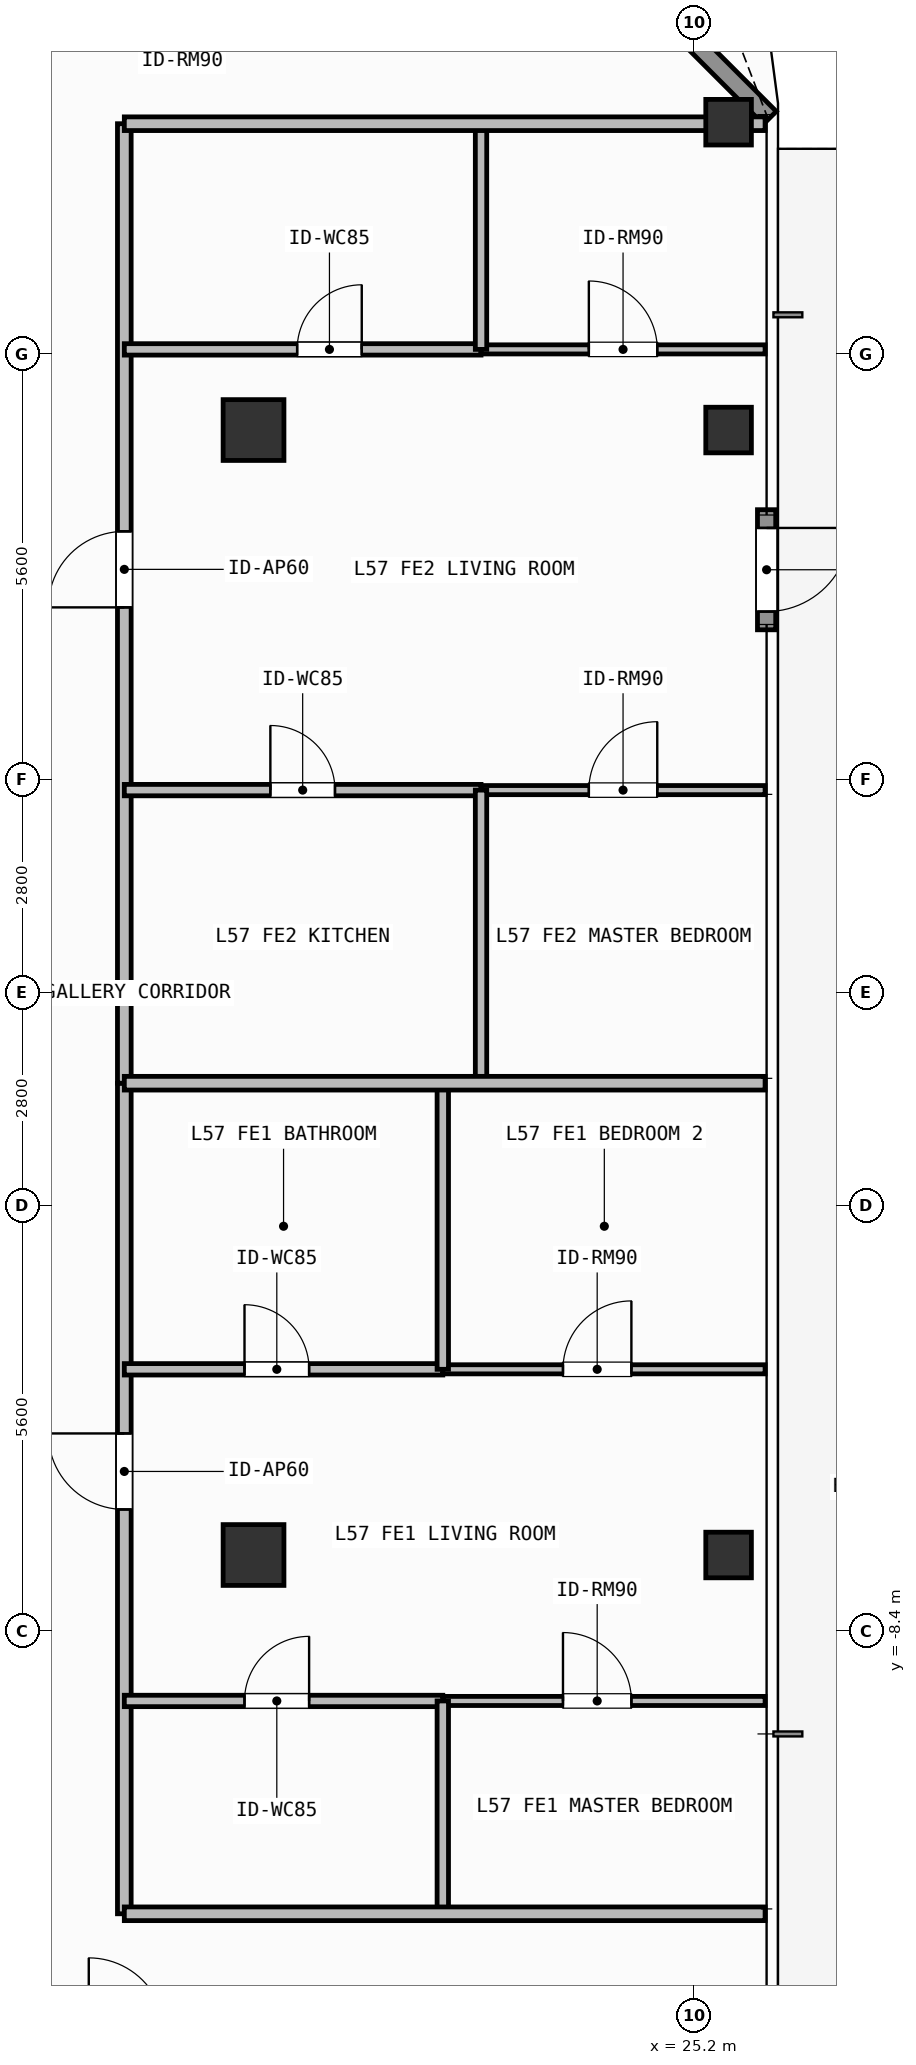
"""IFC4 building model, lengths in metres.
Left out: names, types, materials, properties, quantities, classifications, styles, units other than length and angle.
Written with IfcOpenShell. Run it as: python <this file> out.ifc"""

import sys

from ifc_helpers import new_model, si_unit, direction, frame, frame_2d, origin, origin_2d, place, context, subcontext, project, spatial, rectangle, hollow_rectangle, extrude, element, fill, save


model = new_model("IFC4")
c1 = context("Model", 3, precision=1e-05, world=origin(), true_north=direction((0.0, 1.0)))
c2 = subcontext(c1, "Body", "Model", "MODEL_VIEW")
j1 = project(units=[si_unit("LENGTHUNIT", "METRE"), si_unit("PLANEANGLEUNIT", "RADIAN")], contexts=[c1])
p1 = place(None, origin())
s1 = spatial("IfcSite", under=j1, at=p1, CompositionType="ELEMENT")
p2 = place(p1, origin())
s2 = spatial("IfcBuilding", under=s1, at=p2, CompositionType="ELEMENT")
p3 = place(p2, frame((0.0, 0.0, 231.3)))
s3 = spatial("IfcBuildingStorey", under=s2, at=p3, CompositionType="ELEMENT", Elevation=231.3)
for number, where, z_axis, x_axis in (
    (1, (19.4, -7.4, 0.0), (0.0, 0.0, 1.0), (1.0, 0.0, 0.0)),
    (2, (19.4, 7.4, 0.0), (0.0, 0.0, 1.0), (1.0, 0.0, 0.0)),
):
    element("IfcColumn", number, at=place(p3, frame(where, z_axis=z_axis, x_axis=x_axis)), inside=s3, PredefinedType="COLUMN", context=c2, shape_type="SweptSolid", body=[
        extrude(hollow_rectangle(XDim=0.8, YDim=0.8, WallThickness=0.036, at=origin_2d()), origin(), (0.0, 0.0, 1.0), 3.9),
    ])
for number, where, z_axis, x_axis in (
    (3, (25.65, 11.45, 0.0), (0.0, 0.0, 1.0), (1.0, 0.0, 0.0)),
    (4, (25.65, -7.4, 0.0), (0.0, 0.0, 1.0), (1.0, 0.0, 0.0)),
    (5, (25.65, 7.4, 0.0), (0.0, 0.0, 1.0), (1.0, 0.0, 0.0)),
):
    element("IfcColumn", number, at=place(p3, frame(where, z_axis=z_axis, x_axis=x_axis)), inside=s3, PredefinedType="COLUMN", context=c2, shape_type="SweptSolid", body=[
        extrude(hollow_rectangle(XDim=0.6, YDim=0.6, WallThickness=0.028, at=origin_2d()), origin(), (0.0, 0.0, 1.0), 3.9),
    ])
p4 = place(p3, frame((26.15, 6.352, 0.0), z_axis=(0.0, 0.0, 1.0), x_axis=(0.0, -1.0, 0.0)))
e6 = element("IfcWall", 6, at=p4, inside=s3, PredefinedType="SOLIDWALL", context=c2, shape_type="SweptSolid", body=[
    extrude(rectangle(XDim=1.58, YDim=0.24, at=frame_2d((0.79, 0.0))), origin(), (0.0, 0.0, 1.0), 3.6),
])
p5 = place(p4, frame((0.24, 0.0, 0.0)))
e7 = element("IfcOpeningElement", 7, at=p5, cuts=e6, PredefinedType="OPENING", context=c2, shape_type="SweptSolid", body=[
    extrude(rectangle(XDim=1.1, YDim=2.2, at=frame_2d((0.55, 1.1))), frame((0.0, 0.13, 0.0), z_axis=(0.0, -1.0, 0.0), x_axis=(1.0, 0.0, 0.0)), (0.0, 0.0, 1.0), 0.26),
])
p6 = place(p3, frame((21.808, 15.892, 0.0), z_axis=(0.0, 0.0, 1.0), x_axis=(0.707106781187, -0.707106781187, 0.0)))
e8 = element("IfcWall", 8, at=p6, inside=s3, PredefinedType="SOLIDWALL", context=c2, shape_type="SweptSolid", body=[
    extrude(rectangle(XDim=6.201, YDim=0.24, at=frame_2d((3.101, 0.0))), origin(), (0.0, 0.0, 1.0), 3.6),
])
p7 = place(p6, frame((2.351, 0.0, 0.8)))
e9 = element("IfcOpeningElement", 9, at=p7, cuts=e8, PredefinedType="OPENING", context=c2, shape_type="SweptSolid", body=[
    extrude(rectangle(XDim=1.5, YDim=1.85, at=frame_2d((0.75, 0.925))), frame((0.0, 0.13, 0.0), z_axis=(0.0, -1.0, 0.0), x_axis=(1.0, 0.0, 0.0)), (0.0, 0.0, 1.0), 0.26),
])
p8 = place(p3, frame((17.7, -12.12, 0.0), z_axis=(0.0, 0.0, 1.0), x_axis=(0.0, 1.0, 0.0)))
e10 = element("IfcWall", 10, at=p8, inside=s3, PredefinedType="PARTITIONING", context=c2, shape_type="SweptSolid", body=[
    extrude(rectangle(XDim=10.927, YDim=0.18, at=frame_2d((5.463, 0.0))), origin(), (0.0, 0.0, 1.0), 3.6),
])
p9 = place(p8, frame((5.319, 0.0, 0.0)))
e11 = element("IfcOpeningElement", 11, at=p9, cuts=e10, PredefinedType="OPENING", context=c2, shape_type="SweptSolid", body=[
    extrude(rectangle(XDim=1.0, YDim=2.2, at=frame_2d((0.5, 1.1))), frame((0.0, 0.1, 0.0), z_axis=(0.0, -1.0, 0.0), x_axis=(1.0, 0.0, 0.0)), (0.0, 0.0, 1.0), 0.2),
])
p10 = place(p3, frame((17.7, -4.957, 0.0), z_axis=(0.0, 0.0, 1.0), x_axis=(1.0, 0.0, 0.0)))
e12 = element("IfcWall", 12, at=p10, inside=s3, PredefinedType="PARTITIONING", context=c2, shape_type="SweptSolid", body=[
    extrude(rectangle(XDim=4.19, YDim=0.15, at=frame_2d((2.095, 0.0))), origin(), (0.0, 0.0, 1.0), 3.6),
])
p11 = place(p10, frame((1.581, 0.0, 0.0)))
e13 = element("IfcOpeningElement", 13, at=p11, cuts=e12, PredefinedType="OPENING", context=c2, shape_type="SweptSolid", body=[
    extrude(rectangle(XDim=0.85, YDim=2.1, at=frame_2d((0.425, 1.05))), frame((0.0, 0.085, 0.0), z_axis=(0.0, -1.0, 0.0), x_axis=(1.0, 0.0, 0.0)), (0.0, 0.0, 1.0), 0.17),
])
p12 = place(p3, frame((17.7, -9.32, 0.0), z_axis=(0.0, 0.0, 1.0), x_axis=(1.0, 0.0, 0.0)))
e14 = element("IfcWall", 14, at=p12, inside=s3, PredefinedType="PARTITIONING", context=c2, shape_type="SweptSolid", body=[
    extrude(rectangle(XDim=4.19, YDim=0.15, at=frame_2d((2.095, 0.0))), origin(), (0.0, 0.0, 1.0), 3.6),
])
p13 = place(p12, frame((1.581, 0.0, 0.0)))
e15 = element("IfcOpeningElement", 15, at=p13, cuts=e14, PredefinedType="OPENING", context=c2, shape_type="SweptSolid", body=[
    extrude(rectangle(XDim=0.85, YDim=2.1, at=frame_2d((0.425, 1.05))), frame((0.0, 0.085, 0.0), z_axis=(0.0, -1.0, 0.0), x_axis=(1.0, 0.0, 0.0)), (0.0, 0.0, 1.0), 0.17),
])
p14 = place(p3, frame((21.89, -9.32, 0.0), z_axis=(0.0, 0.0, 1.0), x_axis=(1.0, 0.0, 0.0)))
e16 = element("IfcWall", 16, at=p14, inside=s3, PredefinedType="PARTITIONING", context=c2, shape_type="SweptSolid", body=[
    extrude(rectangle(XDim=4.24, YDim=0.12, at=frame_2d((2.12, 0.0))), origin(), (0.0, 0.0, 1.0), 3.6),
])
p15 = place(p14, frame((1.581, 0.0, 0.0)))
e17 = element("IfcOpeningElement", 17, at=p15, cuts=e16, PredefinedType="OPENING", context=c2, shape_type="SweptSolid", body=[
    extrude(rectangle(XDim=0.9, YDim=2.1, at=frame_2d((0.45, 1.05))), frame((0.0, 0.07, 0.0), z_axis=(0.0, -1.0, 0.0), x_axis=(1.0, 0.0, 0.0)), (0.0, 0.0, 1.0), 0.14),
])
p16 = place(p3, frame((21.89, -4.957, 0.0), z_axis=(0.0, 0.0, 1.0), x_axis=(1.0, 0.0, 0.0)))
e18 = element("IfcWall", 18, at=p16, inside=s3, PredefinedType="PARTITIONING", context=c2, shape_type="SweptSolid", body=[
    extrude(rectangle(XDim=4.24, YDim=0.12, at=frame_2d((2.12, 0.0))), origin(), (0.0, 0.0, 1.0), 3.6),
])
p17 = place(p16, frame((1.581, 0.0, 0.0)))
e19 = element("IfcOpeningElement", 19, at=p17, cuts=e18, PredefinedType="OPENING", context=c2, shape_type="SweptSolid", body=[
    extrude(rectangle(XDim=0.9, YDim=2.1, at=frame_2d((0.45, 1.05))), frame((0.0, 0.07, 0.0), z_axis=(0.0, -1.0, 0.0), x_axis=(1.0, 0.0, 0.0)), (0.0, 0.0, 1.0), 0.14),
])
p18 = place(p3, frame((17.7, -1.193, 0.0), z_axis=(0.0, 0.0, 1.0), x_axis=(0.0, 1.0, 0.0)))
e20 = element("IfcWall", 20, at=p18, inside=s3, PredefinedType="PARTITIONING", context=c2, shape_type="SweptSolid", body=[
    extrude(rectangle(XDim=12.623, YDim=0.18, at=frame_2d((6.312, 0.0))), origin(), (0.0, 0.0, 1.0), 3.6),
])
p19 = place(p18, frame((6.26, 0.0, 0.0)))
e21 = element("IfcOpeningElement", 21, at=p19, cuts=e20, PredefinedType="OPENING", context=c2, shape_type="SweptSolid", body=[
    extrude(rectangle(XDim=1.0, YDim=2.2, at=frame_2d((0.5, 1.1))), frame((0.0, 0.1, 0.0), z_axis=(0.0, -1.0, 0.0), x_axis=(1.0, 0.0, 0.0)), (0.0, 0.0, 1.0), 0.2),
])
p20 = place(p3, frame((17.7, 8.461, 0.0), z_axis=(0.0, 0.0, 1.0), x_axis=(1.0, 0.0, 0.0)))
e22 = element("IfcWall", 22, at=p20, inside=s3, PredefinedType="PARTITIONING", context=c2, shape_type="SweptSolid", body=[
    extrude(rectangle(XDim=4.693, YDim=0.15, at=frame_2d((2.347, 0.0))), origin(), (0.0, 0.0, 1.0), 3.6),
])
p21 = place(p20, frame((2.274, 0.0, 0.0)))
e23 = element("IfcOpeningElement", 23, at=p21, cuts=e22, PredefinedType="OPENING", context=c2, shape_type="SweptSolid", body=[
    extrude(rectangle(XDim=0.85, YDim=2.1, at=frame_2d((0.425, 1.05))), frame((0.0, 0.085, 0.0), z_axis=(0.0, -1.0, 0.0), x_axis=(1.0, 0.0, 0.0)), (0.0, 0.0, 1.0), 0.17),
])
p22 = place(p3, frame((17.7, 2.663, 0.0), z_axis=(0.0, 0.0, 1.0), x_axis=(1.0, 0.0, 0.0)))
e24 = element("IfcWall", 24, at=p22, inside=s3, PredefinedType="PARTITIONING", context=c2, shape_type="SweptSolid", body=[
    extrude(rectangle(XDim=4.693, YDim=0.15, at=frame_2d((2.347, 0.0))), origin(), (0.0, 0.0, 1.0), 3.6),
])
p23 = place(p22, frame((1.921, 0.0, 0.0)))
e25 = element("IfcOpeningElement", 25, at=p23, cuts=e24, PredefinedType="OPENING", context=c2, shape_type="SweptSolid", body=[
    extrude(rectangle(XDim=0.85, YDim=2.1, at=frame_2d((0.425, 1.05))), frame((0.0, 0.085, 0.0), z_axis=(0.0, -1.0, 0.0), x_axis=(1.0, 0.0, 0.0)), (0.0, 0.0, 1.0), 0.17),
])
p24 = place(p3, frame((22.393, 2.663, 0.0), z_axis=(0.0, 0.0, 1.0), x_axis=(1.0, 0.0, 0.0)))
e26 = element("IfcWall", 26, at=p24, inside=s3, PredefinedType="PARTITIONING", context=c2, shape_type="SweptSolid", body=[
    extrude(rectangle(XDim=3.737, YDim=0.12, at=frame_2d((1.868, 0.0))), origin(), (0.0, 0.0, 1.0), 3.6),
])
p25 = place(p24, frame((1.418, 0.0, 0.0)))
e27 = element("IfcOpeningElement", 27, at=p25, cuts=e26, PredefinedType="OPENING", context=c2, shape_type="SweptSolid", body=[
    extrude(rectangle(XDim=0.9, YDim=2.1, at=frame_2d((0.45, 1.05))), frame((0.0, 0.07, 0.0), z_axis=(0.0, -1.0, 0.0), x_axis=(1.0, 0.0, 0.0)), (0.0, 0.0, 1.0), 0.14),
])
p26 = place(p3, frame((22.393, 8.461, 0.0), z_axis=(0.0, 0.0, 1.0), x_axis=(1.0, 0.0, 0.0)))
e28 = element("IfcWall", 28, at=p26, inside=s3, PredefinedType="PARTITIONING", context=c2, shape_type="SweptSolid", body=[
    extrude(rectangle(XDim=3.737, YDim=0.12, at=frame_2d((1.868, 0.0))), origin(), (0.0, 0.0, 1.0), 3.6),
])
p27 = place(p26, frame((1.418, 0.0, 0.0)))
e29 = element("IfcOpeningElement", 29, at=p27, cuts=e28, PredefinedType="OPENING", context=c2, shape_type="SweptSolid", body=[
    extrude(rectangle(XDim=0.9, YDim=2.1, at=frame_2d((0.45, 1.05))), frame((0.0, 0.07, 0.0), z_axis=(0.0, -1.0, 0.0), x_axis=(1.0, 0.0, 0.0)), (0.0, 0.0, 1.0), 0.14),
])
p28 = place(p3, frame((21.89, -12.12, 0.0), z_axis=(0.0, 0.0, 1.0), x_axis=(0.0, 1.0, 0.0)))
e30 = element("IfcWall", 30, at=p28, inside=s3, PredefinedType="PARTITIONING", context=c2, shape_type="SweptSolid", body=[
    extrude(rectangle(XDim=2.8, YDim=0.15, at=frame_2d((1.4, 0.0))), origin(), (0.0, 0.0, 1.0), 3.6),
])
p29 = place(p3, frame((21.89, -4.957, 0.0), z_axis=(0.0, 0.0, 1.0), x_axis=(0.0, 1.0, 0.0)))
e31 = element("IfcWall", 31, at=p29, inside=s3, PredefinedType="PARTITIONING", context=c2, shape_type="SweptSolid", body=[
    extrude(rectangle(XDim=3.764, YDim=0.15, at=frame_2d((1.882, 0.0))), origin(), (0.0, 0.0, 1.0), 3.6),
])
p30 = place(p3, frame((22.393, -1.193, 0.0), z_axis=(0.0, 0.0, 1.0), x_axis=(0.0, 1.0, 0.0)))
e32 = element("IfcWall", 32, at=p30, inside=s3, PredefinedType="PARTITIONING", context=c2, shape_type="SweptSolid", body=[
    extrude(rectangle(XDim=3.856, YDim=0.15, at=frame_2d((1.928, 0.0))), origin(), (0.0, 0.0, 1.0), 3.6),
])
p31 = place(p3, frame((22.393, 8.461, 0.0), z_axis=(0.0, 0.0, 1.0), x_axis=(0.0, 1.0, 0.0)))
e33 = element("IfcWall", 33, at=p31, inside=s3, PredefinedType="PARTITIONING", context=c2, shape_type="SweptSolid", body=[
    extrude(rectangle(XDim=2.969, YDim=0.15, at=frame_2d((1.484, 0.0))), origin(), (0.0, 0.0, 1.0), 3.6),
])
for number, where, z_axis, x_axis in (
    (34, (17.7, -1.193, 0.0), (0.0, 0.0, 1.0), (1.0, 0.0, 0.0)),
    (35, (17.7, -12.12, 0.0), (0.0, 0.0, 1.0), (1.0, 0.0, 0.0)),
):
    element("IfcWall", number, at=place(p3, frame(where, z_axis=z_axis, x_axis=x_axis)), inside=s3, PredefinedType="PARTITIONING", context=c2, shape_type="SweptSolid", body=[
        extrude(rectangle(XDim=8.43, YDim=0.18, at=frame_2d((4.215, 0.0))), origin(), (0.0, 0.0, 1.0), 3.6),
    ])
p32 = place(p3, frame((17.7, 11.43, 0.0), z_axis=(0.0, 0.0, 1.0), x_axis=(1.0, 0.0, 0.0)))
e36 = element("IfcWall", 36, at=p32, inside=s3, PredefinedType="PARTITIONING", context=c2, shape_type="SweptSolid", body=[
    extrude(rectangle(XDim=8.43, YDim=0.18, at=frame_2d((4.215, 0.0))), origin(), (0.0, 0.0, 1.0), 3.34),
])
p33 = place(p5, origin())
e37 = element("IfcDoor", 37, at=p33, inside=s3, OperationType="SINGLE_SWING_LEFT", PredefinedType="DOOR", context=c2, shape_type="SweptSolid", body=[
    extrude(rectangle(XDim=1.1, YDim=2.2, at=frame_2d((0.55, 1.1))), frame((0.0, 0.025, 0.0), z_axis=(0.0, -1.0, 0.0), x_axis=(1.0, 0.0, 0.0)), (0.0, 0.0, 1.0), 0.05),
])
fill(e7, e37)
p34 = place(p9, origin())
e38 = element("IfcDoor", 38, at=p34, inside=s3, OperationType="SINGLE_SWING_RIGHT", PredefinedType="DOOR", context=c2, shape_type="SweptSolid", body=[
    extrude(rectangle(XDim=1.0, YDim=2.2, at=frame_2d((0.5, 1.1))), frame((0.0, 0.025, 0.0), z_axis=(0.0, -1.0, 0.0), x_axis=(1.0, 0.0, 0.0)), (0.0, 0.0, 1.0), 0.05),
])
fill(e11, e38)
p35 = place(p11, origin())
e39 = element("IfcDoor", 39, at=p35, inside=s3, OperationType="SINGLE_SWING_LEFT", PredefinedType="DOOR", context=c2, shape_type="SweptSolid", body=[
    extrude(rectangle(XDim=0.85, YDim=2.1, at=frame_2d((0.425, 1.05))), frame((0.0, 0.025, 0.0), z_axis=(0.0, -1.0, 0.0), x_axis=(1.0, 0.0, 0.0)), (0.0, 0.0, 1.0), 0.05),
])
fill(e13, e39)
p36 = place(p13, origin())
e40 = element("IfcDoor", 40, at=p36, inside=s3, OperationType="SINGLE_SWING_RIGHT", PredefinedType="DOOR", context=c2, shape_type="SweptSolid", body=[
    extrude(rectangle(XDim=0.85, YDim=2.1, at=frame_2d((0.425, 1.05))), frame((0.0, 0.025, 0.0), z_axis=(0.0, -1.0, 0.0), x_axis=(1.0, 0.0, 0.0)), (0.0, 0.0, 1.0), 0.05),
])
fill(e15, e40)
p37 = place(p15, origin())
e41 = element("IfcDoor", 41, at=p37, inside=s3, OperationType="SINGLE_SWING_LEFT", PredefinedType="DOOR", context=c2, shape_type="SweptSolid", body=[
    extrude(rectangle(XDim=0.9, YDim=2.1, at=frame_2d((0.45, 1.05))), frame((0.0, 0.025, 0.0), z_axis=(0.0, -1.0, 0.0), x_axis=(1.0, 0.0, 0.0)), (0.0, 0.0, 1.0), 0.05),
])
fill(e17, e41)
p38 = place(p17, origin())
e42 = element("IfcDoor", 42, at=p38, inside=s3, OperationType="SINGLE_SWING_RIGHT", PredefinedType="DOOR", context=c2, shape_type="SweptSolid", body=[
    extrude(rectangle(XDim=0.9, YDim=2.1, at=frame_2d((0.45, 1.05))), frame((0.0, 0.025, 0.0), z_axis=(0.0, -1.0, 0.0), x_axis=(1.0, 0.0, 0.0)), (0.0, 0.0, 1.0), 0.05),
])
fill(e19, e42)
p39 = place(p19, origin())
e43 = element("IfcDoor", 43, at=p39, inside=s3, OperationType="SINGLE_SWING_LEFT", PredefinedType="DOOR", context=c2, shape_type="SweptSolid", body=[
    extrude(rectangle(XDim=1.0, YDim=2.2, at=frame_2d((0.5, 1.1))), frame((0.0, 0.025, 0.0), z_axis=(0.0, -1.0, 0.0), x_axis=(1.0, 0.0, 0.0)), (0.0, 0.0, 1.0), 0.05),
])
fill(e21, e43)
p40 = place(p21, origin())
e44 = element("IfcDoor", 44, at=p40, inside=s3, OperationType="SINGLE_SWING_RIGHT", PredefinedType="DOOR", context=c2, shape_type="SweptSolid", body=[
    extrude(rectangle(XDim=0.85, YDim=2.1, at=frame_2d((0.425, 1.05))), frame((0.0, 0.025, 0.0), z_axis=(0.0, -1.0, 0.0), x_axis=(1.0, 0.0, 0.0)), (0.0, 0.0, 1.0), 0.05),
])
fill(e23, e44)
p41 = place(p23, origin())
e45 = element("IfcDoor", 45, at=p41, inside=s3, OperationType="SINGLE_SWING_LEFT", PredefinedType="DOOR", context=c2, shape_type="SweptSolid", body=[
    extrude(rectangle(XDim=0.85, YDim=2.1, at=frame_2d((0.425, 1.05))), frame((0.0, 0.025, 0.0), z_axis=(0.0, -1.0, 0.0), x_axis=(1.0, 0.0, 0.0)), (0.0, 0.0, 1.0), 0.05),
])
fill(e25, e45)
p42 = place(p25, origin())
e46 = element("IfcDoor", 46, at=p42, inside=s3, OperationType="SINGLE_SWING_RIGHT", PredefinedType="DOOR", context=c2, shape_type="SweptSolid", body=[
    extrude(rectangle(XDim=0.9, YDim=2.1, at=frame_2d((0.45, 1.05))), frame((0.0, 0.025, 0.0), z_axis=(0.0, -1.0, 0.0), x_axis=(1.0, 0.0, 0.0)), (0.0, 0.0, 1.0), 0.05),
])
fill(e27, e46)
p43 = place(p27, origin())
e47 = element("IfcDoor", 47, at=p43, inside=s3, OperationType="SINGLE_SWING_LEFT", PredefinedType="DOOR", context=c2, shape_type="SweptSolid", body=[
    extrude(rectangle(XDim=0.9, YDim=2.1, at=frame_2d((0.45, 1.05))), frame((0.0, 0.025, 0.0), z_axis=(0.0, -1.0, 0.0), x_axis=(1.0, 0.0, 0.0)), (0.0, 0.0, 1.0), 0.05),
])
fill(e29, e47)
save(model, sys.argv[1])
